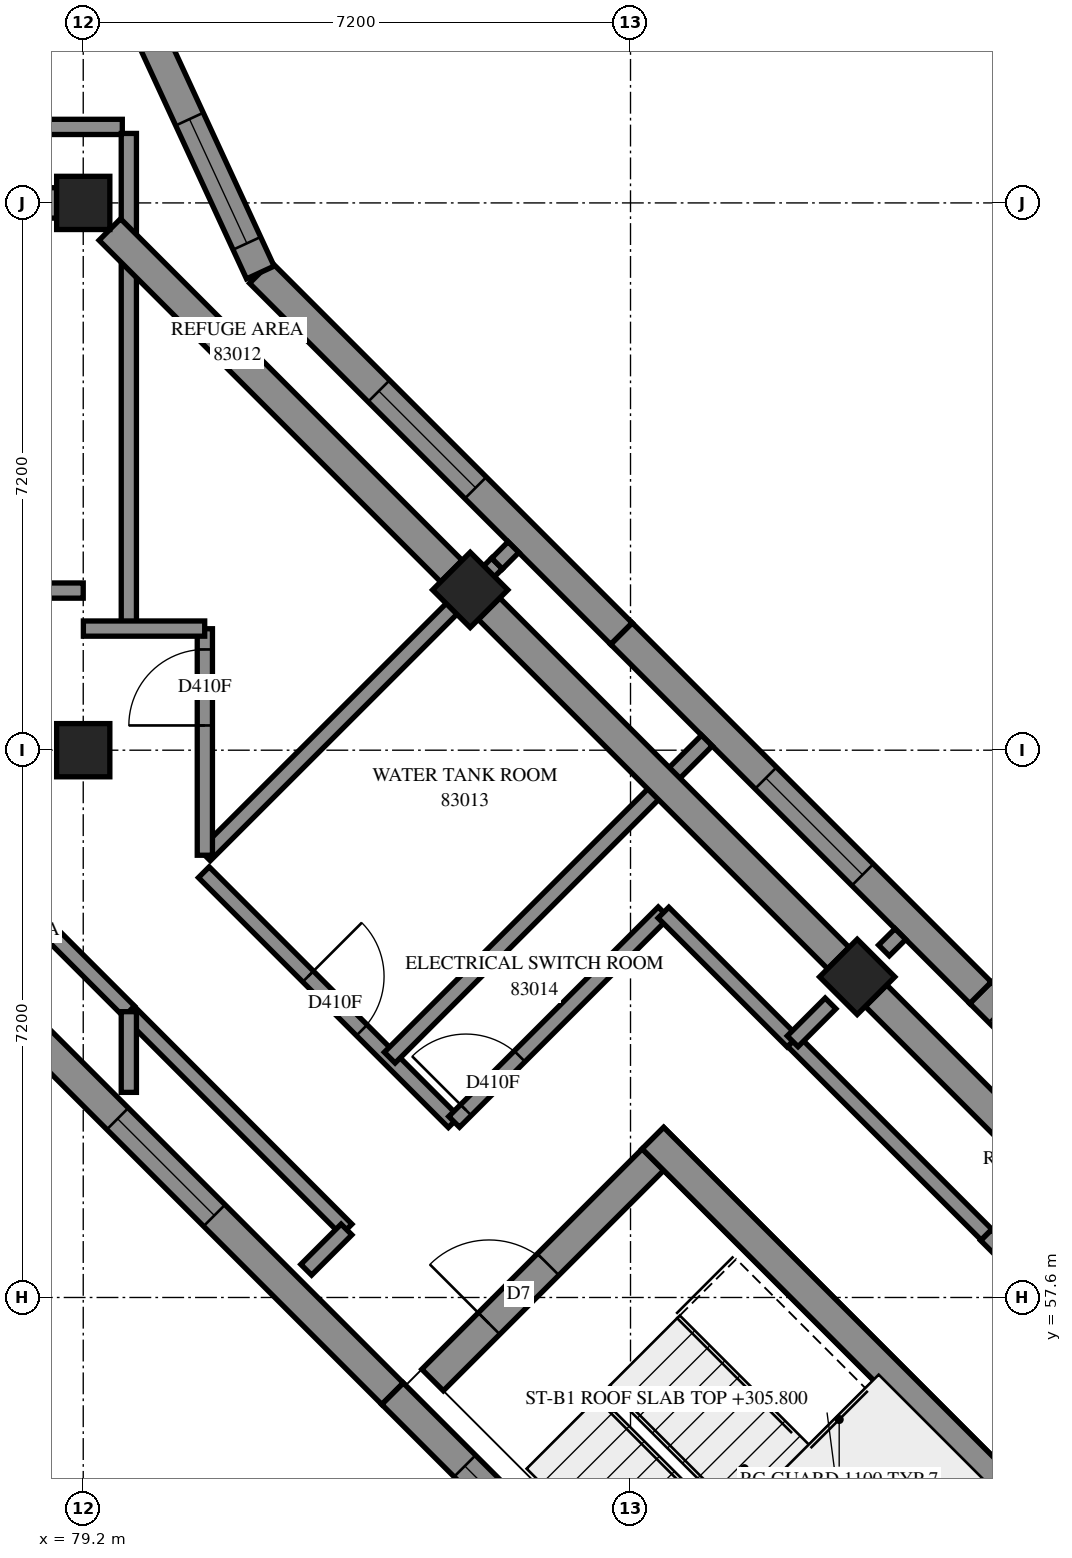
"""IFC4 building model, lengths in metres.
Left out: names, types, materials, properties, quantities, classifications, styles, units other than length and angle.
Written with IfcOpenShell. Run it as: python <this file> out.ifc"""

import sys

from ifc_helpers import new_model, si_unit, direction, frame, frame_2d, origin, origin_2d, place, context, subcontext, project, spatial, polyline, rectangle, outline, extrude, element, fill, save


model = new_model("IFC4")
c1 = context("Model", 3, precision=1e-05, world=origin(), true_north=direction((0.0, 1.0)))
c2 = subcontext(c1, "Body", "Model", "MODEL_VIEW")
j1 = project(units=[si_unit("LENGTHUNIT", "METRE"), si_unit("PLANEANGLEUNIT", "RADIAN")], contexts=[c1])
p1 = place(None, origin())
s1 = spatial("IfcSite", under=j1, at=p1, CompositionType="ELEMENT")
p2 = place(p1, origin())
s2 = spatial("IfcBuilding", under=s1, at=p2, CompositionType="ELEMENT")
p3 = place(p2, frame((0.0, 0.0, 305.8)))
s3 = spatial("IfcBuildingStorey", under=s2, at=p3, CompositionType="ELEMENT", Elevation=305.8)
for number, where, z_axis, x_axis in (
    (1, (79.2, 64.8, 0.0), (0.0, 0.0, 1.0), (1.0, 0.0, 0.0)),
    (2, (79.2, 72.0, 0.0), (0.0, 0.0, 1.0), (1.0, 0.0, 0.0)),
    (3, (84.291, 66.909, 0.0), (0.0, 0.0, 1.0), (0.707, -0.707, 0.0)),
    (4, (89.382, 61.818, 0.0), (0.0, 0.0, 1.0), (0.707, -0.707, 0.0)),
):
    element("IfcColumn", number, at=place(p3, frame(where, z_axis=z_axis, x_axis=x_axis)), inside=s3, PredefinedType="COLUMN", context=c2, shape_type="SweptSolid", body=[
        extrude(rectangle(XDim=0.7, YDim=0.7, at=origin_2d()), origin(), (0.0, 0.0, 1.0), 3.5),
    ])
p4 = place(p3, frame((86.695, 59.696, -0.3), z_axis=(0.0, 0.0, 1.0), x_axis=(0.7071100706, -0.7071034917, 0.0)))
e5 = element("IfcWall", 5, at=p4, inside=s3, PredefinedType="SHEAR", context=c2, shape_type="SweptSolid", body=[
    extrude(outline(polyline([(0.0, 0.0), (15.2, 0.0), (15.2, 3.1), (0.0, 3.1), (0.0, 0.0)])), frame((0.0, 0.2, 0.0), z_axis=(0.0, -1.0, 0.0), x_axis=(1.0, 0.0, 0.0)), (0.0, 0.0, 1.0), 0.4),
])
p5 = place(p4, frame((10.4, 0.0, 0.3)))
e6 = element("IfcOpeningElement", 6, at=p5, cuts=e5, PredefinedType="OPENING", context=c2, shape_type="SweptSolid", body=[
    extrude(rectangle(XDim=0.8, YDim=2.1, at=frame_2d((0.4, 1.05))), frame((0.0, 0.21, 0.0), z_axis=(0.0, -1.0, 0.0), x_axis=(1.0, 0.0, 0.0)), (0.0, 0.0, 1.0), 0.42),
])
p6 = place(p3, frame((83.796, 56.514, -0.3), z_axis=(0.0, 0.0, 1.0), x_axis=(0.7071067812, 0.7071067812, 0.0)))
e7 = element("IfcWall", 7, at=p6, inside=s3, PredefinedType="SHEAR", context=c2, shape_type="SweptSolid", body=[
    extrude(outline(polyline([(0.0, 0.0), (4.1, 0.0), (4.1, 3.1), (0.0, 3.1), (0.0, 0.0)])), frame((0.0, 0.2, 0.0), z_axis=(0.0, -1.0, 0.0), x_axis=(1.0, 0.0, 0.0)), (0.0, 0.0, 1.0), 0.4),
])
p7 = place(p6, frame((1.05, 0.0, 0.3)))
e8 = element("IfcOpeningElement", 8, at=p7, cuts=e7, PredefinedType="OPENING", context=c2, shape_type="SweptSolid", body=[
    extrude(rectangle(XDim=1.1, YDim=2.1, at=frame_2d((0.55, 1.05))), frame((0.0, 0.21, 0.0), z_axis=(0.0, -1.0, 0.0), x_axis=(1.0, 0.0, 0.0)), (0.0, 0.0, 1.0), 0.42),
])
p8 = place(p3, frame((95.73, 56.884, 0.0), z_axis=(0.0, 0.0, 1.0), x_axis=(-0.7071067812, 0.7071067812, 0.0)))
e9 = element("IfcWall", 9, at=p8, inside=s3, PredefinedType="SOLIDWALL", context=c2, shape_type="SweptSolid", body=[
    extrude(outline(polyline([(0.0, -0.2), (6.682, -0.2), (6.682, 0.2), (0.0, 0.2), (0.0, -0.2)])), origin(), (0.0, 0.0, 1.0), 3.5),
])
p9 = place(p8, frame((1.677, 0.0, 0.7)))
e10 = element("IfcOpeningElement", 10, at=p9, cuts=e9, PredefinedType="OPENING", context=c2, shape_type="SweptSolid", body=[
    extrude(rectangle(XDim=1.8, YDim=2.2, at=frame_2d((0.9, 1.1))), frame((0.0, 0.21, 0.0), z_axis=(0.0, -1.0, 0.0), x_axis=(1.0, 0.0, 0.0)), (0.0, 0.0, 1.0), 0.42),
])
p10 = place(p8, frame((4.529, 0.0, 0.7)))
e11 = element("IfcOpeningElement", 11, at=p10, cuts=e9, PredefinedType="OPENING", context=c2, shape_type="SweptSolid", body=[
    extrude(rectangle(XDim=1.8, YDim=2.2, at=frame_2d((0.9, 1.1))), frame((0.0, 0.21, 0.0), z_axis=(0.0, -1.0, 0.0), x_axis=(1.0, 0.0, 0.0)), (0.0, 0.0, 1.0), 0.42),
])
p11 = place(p3, frame((91.005, 61.609, 0.0), z_axis=(0.0, 0.0, 1.0), x_axis=(-0.7071142638, 0.7070992985, 0.0)))
e12 = element("IfcWall", 12, at=p11, inside=s3, PredefinedType="SOLIDWALL", context=c2, shape_type="SweptSolid", body=[
    extrude(outline(polyline([(0.0, -0.2), (6.682, -0.2), (6.682, 0.2), (0.0, 0.2), (0.0, -0.2)])), origin(), (0.0, 0.0, 1.0), 3.5),
])
p12 = place(p11, frame((2.195, 0.0, 0.7)))
e13 = element("IfcOpeningElement", 13, at=p12, cuts=e12, PredefinedType="OPENING", context=c2, shape_type="SweptSolid", body=[
    extrude(rectangle(XDim=1.8, YDim=2.2, at=frame_2d((0.9, 1.1))), frame((0.0, 0.21, 0.0), z_axis=(0.0, -1.0, 0.0), x_axis=(1.0, 0.0, 0.0)), (0.0, 0.0, 1.0), 0.42),
])
p13 = place(p3, frame((86.28, 66.334, 0.0), z_axis=(0.0, 0.0, 1.0), x_axis=(-0.7071067812, 0.7071067812, 0.0)))
e14 = element("IfcWall", 14, at=p13, inside=s3, PredefinedType="SOLIDWALL", context=c2, shape_type="SweptSolid", body=[
    extrude(outline(polyline([(0.0, -0.2), (6.682, -0.2), (6.753, 0.2), (0.0, 0.2), (0.0, -0.2)])), origin(), (0.0, 0.0, 1.0), 3.5),
])
p14 = place(p13, frame((2.712, 0.0, 0.7)))
e15 = element("IfcOpeningElement", 15, at=p14, cuts=e14, PredefinedType="OPENING", context=c2, shape_type="SweptSolid", body=[
    extrude(rectangle(XDim=1.8, YDim=2.2, at=frame_2d((0.9, 1.1))), frame((0.0, 0.21, 0.0), z_axis=(0.0, -1.0, 0.0), x_axis=(1.0, 0.0, 0.0)), (0.0, 0.0, 1.0), 0.42),
])
p15 = place(p3, frame((81.53, 71.085, 0.0), z_axis=(0.0, 0.0, 1.0), x_axis=(-0.4192593081, 0.9078665279, 0.0)))
e16 = element("IfcWall", 16, at=p15, inside=s3, PredefinedType="SOLIDWALL", context=c2, shape_type="SweptSolid", body=[
    extrude(outline(polyline([(0.036, -0.2), (3.596, -0.2), (3.34, 0.2), (-0.036, 0.2), (0.036, -0.2)])), origin(), (0.0, 0.0, 1.0), 3.5),
])
p16 = place(p15, frame((0.423, 0.0, 0.7)))
e17 = element("IfcOpeningElement", 17, at=p16, cuts=e16, PredefinedType="OPENING", context=c2, shape_type="SweptSolid", body=[
    extrude(rectangle(XDim=1.8, YDim=2.2, at=frame_2d((0.9, 1.1))), frame((0.0, 0.21, 0.0), z_axis=(0.0, -1.0, 0.0), x_axis=(1.0, 0.0, 0.0)), (0.0, 0.0, 1.0), 0.42),
])
p17 = place(p3, frame((78.548, 61.055, 0.0), z_axis=(0.0, 0.0, 1.0), x_axis=(0.7071067812, -0.7071067812, 0.0)))
e18 = element("IfcWall", 18, at=p17, inside=s3, PredefinedType="SOLIDWALL", context=c2, shape_type="SweptSolid", body=[
    extrude(outline(polyline([(0.036, -0.2), (6.677, -0.2), (6.677, 0.2), (-0.036, 0.2), (0.036, -0.2)])), origin(), (0.0, 0.0, 1.0), 3.5),
])
p18 = place(p17, frame((1.561, 0.0, 0.7)))
e19 = element("IfcOpeningElement", 19, at=p18, cuts=e18, PredefinedType="OPENING", context=c2, shape_type="SweptSolid", body=[
    extrude(rectangle(XDim=1.8, YDim=2.2, at=frame_2d((0.9, 1.1))), frame((0.0, 0.21, 0.0), z_axis=(0.0, -1.0, 0.0), x_axis=(1.0, 0.0, 0.0)), (0.0, 0.0, 1.0), 0.42),
])
p19 = place(p3, frame((83.269, 56.334, 0.0), z_axis=(0.0, 0.0, 1.0), x_axis=(0.7071067812, -0.7071067812, 0.0)))
e20 = element("IfcWall", 20, at=p19, inside=s3, PredefinedType="SOLIDWALL", context=c2, shape_type="SweptSolid", body=[
    extrude(outline(polyline([(0.0, -0.2), (6.641, -0.2), (6.641, 0.2), (0.0, 0.2), (0.0, -0.2)])), origin(), (0.0, 0.0, 1.0), 3.5),
])
p20 = place(p19, frame((1.345, 0.0, 0.7)))
e21 = element("IfcOpeningElement", 21, at=p20, cuts=e20, PredefinedType="OPENING", context=c2, shape_type="SweptSolid", body=[
    extrude(rectangle(XDim=1.8, YDim=2.2, at=frame_2d((0.9, 1.1))), frame((0.0, 0.21, 0.0), z_axis=(0.0, -1.0, 0.0), x_axis=(1.0, 0.0, 0.0)), (0.0, 0.0, 1.0), 0.42),
])
p21 = place(p19, frame((4.343, 0.0, 0.7)))
e22 = element("IfcOpeningElement", 22, at=p21, cuts=e20, PredefinedType="OPENING", context=c2, shape_type="SweptSolid", body=[
    extrude(rectangle(XDim=1.8, YDim=2.2, at=frame_2d((0.9, 1.1))), frame((0.0, 0.21, 0.0), z_axis=(0.0, -1.0, 0.0), x_axis=(1.0, 0.0, 0.0)), (0.0, 0.0, 1.0), 0.42),
])
p22 = place(p3, frame((62.767, 73.0, 0.0), z_axis=(0.0, 0.0, 1.0), x_axis=(1.0, 0.0, 0.0)))
e23 = element("IfcWall", 23, at=p22, inside=s3, PredefinedType="PARTITIONING", context=c2, shape_type="SweptSolid", body=[
    extrude(rectangle(XDim=16.947, YDim=0.2, at=frame_2d((8.473, 0.0))), origin(), (0.0, 0.0, 1.0), 3.5),
])
p23 = place(p3, frame((91.077, 58.421, 0.0), z_axis=(0.0, 0.0, 1.0), x_axis=(0.7070532037, -0.7071603546, 0.0)))
e24 = element("IfcWall", 24, at=p23, inside=s3, PredefinedType="PARTITIONING", context=c2, shape_type="SweptSolid", body=[
    extrude(rectangle(XDim=11.199, YDim=0.2, at=frame_2d((5.6, 0.0))), origin(), (0.0, 0.0, 1.0), 3.5),
])
p24 = place(p23, frame((0.286, 0.0, 0.0)))
e25 = element("IfcOpeningElement", 25, at=p24, cuts=e24, PredefinedType="OPENING", context=c2, shape_type="SweptSolid", body=[
    extrude(rectangle(XDim=1.0, YDim=2.1, at=frame_2d((0.5, 1.05))), frame((0.0, 0.11, 0.0), z_axis=(0.0, -1.0, 0.0), x_axis=(1.0, 0.0, 0.0)), (0.0, 0.0, 1.0), 0.22),
])
p25 = place(p23, frame((7.486, 0.0, 0.0)))
e26 = element("IfcOpeningElement", 26, at=p25, cuts=e24, PredefinedType="OPENING", context=c2, shape_type="SweptSolid", body=[
    extrude(rectangle(XDim=1.0, YDim=2.1, at=frame_2d((0.5, 1.05))), frame((0.0, 0.11, 0.0), z_axis=(0.0, -1.0, 0.0), x_axis=(1.0, 0.0, 0.0)), (0.0, 0.0, 1.0), 0.22),
])
p26 = place(p3, frame((79.8, 66.4, 0.0), z_axis=(0.0, 0.0, 1.0), x_axis=(0.0, 1.0, 0.0)))
e27 = element("IfcWall", 27, at=p26, inside=s3, PredefinedType="PARTITIONING", context=c2, shape_type="SweptSolid", body=[
    extrude(rectangle(XDim=6.514, YDim=0.2, at=frame_2d((3.257, 0.0))), origin(), (0.0, 0.0, 1.0), 3.5),
])
p27 = place(p3, frame((80.787, 63.194, 0.0), z_axis=(0.0, 0.0, 1.0), x_axis=(0.7071067812, -0.7071067812, 0.0)))
e28 = element("IfcWall", 28, at=p27, inside=s3, PredefinedType="PARTITIONING", context=c2, shape_type="SweptSolid", body=[
    extrude(rectangle(XDim=4.65, YDim=0.2, at=frame_2d((2.325, 0.0))), origin(), (0.0, 0.0, 1.0), 3.5),
])
p28 = place(p27, frame((1.939, 0.0, 0.0)))
e29 = element("IfcOpeningElement", 29, at=p28, cuts=e28, PredefinedType="OPENING", context=c2, shape_type="SweptSolid", body=[
    extrude(rectangle(XDim=1.0, YDim=2.1, at=frame_2d((0.5, 1.05))), frame((0.0, 0.11, 0.0), z_axis=(0.0, -1.0, 0.0), x_axis=(1.0, 0.0, 0.0)), (0.0, 0.0, 1.0), 0.22),
])
p29 = place(p3, frame((80.801, 63.417, 0.0), z_axis=(0.0, 0.0, 1.0), x_axis=(0.70732766, 0.7068858333, 0.0)))
e30 = element("IfcWall", 30, at=p29, inside=s3, PredefinedType="PARTITIONING", context=c2, shape_type="SweptSolid", body=[
    extrude(rectangle(XDim=5.432, YDim=0.2, at=frame_2d((2.716, 0.0))), origin(), (0.0, 0.0, 1.0), 3.5),
])
p30 = place(p3, frame((79.8, 61.36, 0.0), z_axis=(0.0, 0.0, 1.0), x_axis=(0.7068599295, -0.7073535467, 0.0)))
e31 = element("IfcWall", 31, at=p30, inside=s3, PredefinedType="PARTITIONING", context=c2, shape_type="SweptSolid", body=[
    extrude(rectangle(XDim=4.052, YDim=0.2, at=frame_2d((2.026, 0.0))), origin(), (0.0, 0.0, 1.0), 3.5),
])
p31 = place(p3, frame((84.079, 59.91, 0.0), z_axis=(0.0, 0.0, 1.0), x_axis=(0.7071067812, 0.7071067812, 0.0)))
e32 = element("IfcWall", 32, at=p31, inside=s3, PredefinedType="PARTITIONING", context=c2, shape_type="SweptSolid", body=[
    extrude(rectangle(XDim=3.898, YDim=0.2, at=frame_2d((1.949, 0.0))), origin(), (0.0, 0.0, 1.0), 3.5),
])
p32 = place(p31, frame((0.219, 0.0, 0.0)))
e33 = element("IfcOpeningElement", 33, at=p32, cuts=e32, PredefinedType="OPENING", context=c2, shape_type="SweptSolid", body=[
    extrude(rectangle(XDim=1.0, YDim=2.1, at=frame_2d((0.5, 1.05))), frame((0.0, 0.11, 0.0), z_axis=(0.0, -1.0, 0.0), x_axis=(1.0, 0.0, 0.0)), (0.0, 0.0, 1.0), 0.22),
])
p33 = place(p3, frame((88.537, 60.973, 0.0), z_axis=(0.0, 0.0, 1.0), x_axis=(0.7071067812, -0.7071067812, 0.0)))
e34 = element("IfcWall", 34, at=p33, inside=s3, PredefinedType="PARTITIONING", context=c2, shape_type="SweptSolid", body=[
    extrude(rectangle(XDim=3.601, YDim=0.2, at=frame_2d((1.8, 0.0))), origin(), (0.0, 0.0, 1.0), 3.5),
])
p34 = place(p3, frame((80.8, 63.418, 0.0), z_axis=(0.0, 0.0, 1.0), x_axis=(0.0, 1.0, 0.0)))
e35 = element("IfcWall", 35, at=p34, inside=s3, PredefinedType="PARTITIONING", context=c2, shape_type="SweptSolid", body=[
    extrude(rectangle(XDim=2.98, YDim=0.2, at=frame_2d((1.49, 0.0))), origin(), (0.0, 0.0, 1.0), 3.5),
])
p35 = place(p34, frame((1.708, 0.0, 0.0)))
e36 = element("IfcOpeningElement", 36, at=p35, cuts=e35, PredefinedType="OPENING", context=c2, shape_type="SweptSolid", body=[
    extrude(rectangle(XDim=1.0, YDim=2.1, at=frame_2d((0.5, 1.05))), frame((0.0, 0.11, 0.0), z_axis=(0.0, -1.0, 0.0), x_axis=(1.0, 0.0, 0.0)), (0.0, 0.0, 1.0), 0.22),
])
p36 = place(p3, frame((77.603, 63.563, 0.0), z_axis=(0.0, 0.0, 1.0), x_axis=(0.7071067812, -0.7071067812, 0.0)))
e37 = element("IfcWall", 37, at=p36, inside=s3, PredefinedType="PARTITIONING", context=c2, shape_type="SweptSolid", body=[
    extrude(rectangle(XDim=3.111, YDim=0.2, at=frame_2d((1.556, 0.0))), origin(), (0.0, 0.0, 1.0), 3.5),
])
p37 = place(p3, frame((86.833, 62.663, 0.0), z_axis=(0.0, 0.0, 1.0), x_axis=(0.7075233388, -0.706689978, 0.0)))
e38 = element("IfcWall", 38, at=p37, inside=s3, PredefinedType="PARTITIONING", context=c2, shape_type="SweptSolid", body=[
    extrude(rectangle(XDim=2.4, YDim=0.2, at=frame_2d((1.2, 0.0))), origin(), (0.0, 0.0, 1.0), 3.5),
])
p38 = place(p3, frame((77.088, 66.9, 0.0), z_axis=(0.0, 0.0, 1.0), x_axis=(1.0, 0.0, 0.0)))
e39 = element("IfcWall", 39, at=p38, inside=s3, PredefinedType="PARTITIONING", context=c2, shape_type="SweptSolid", body=[
    extrude(rectangle(XDim=2.112, YDim=0.2, at=frame_2d((1.056, 0.0))), origin(), (0.0, 0.0, 1.0), 3.5),
])
p39 = place(p3, frame((79.8, 60.298, 0.0), z_axis=(0.0, 0.0, 1.0), x_axis=(0.0, 1.0, 0.0)))
e40 = element("IfcWall", 40, at=p39, inside=s3, PredefinedType="PARTITIONING", context=c2, shape_type="SweptSolid", body=[
    extrude(rectangle(XDim=1.062, YDim=0.2, at=frame_2d((0.531, 0.0))), origin(), (0.0, 0.0, 1.0), 3.5),
])
p40 = place(p3, frame((79.202, 66.4, 0.0), z_axis=(0.0, 0.0, 1.0), x_axis=(1.0, 0.0, 0.0)))
e41 = element("IfcWall", 41, at=p40, inside=s3, PredefinedType="PARTITIONING", context=c2, shape_type="SweptSolid", body=[
    extrude(rectangle(XDim=1.596, YDim=0.2, at=frame_2d((0.798, 0.0))), origin(), (0.0, 0.0, 1.0), 3.5),
])
p41 = place(p3, frame((82.134, 57.965, 0.0), z_axis=(0.0, 0.0, 1.0), x_axis=(0.7071735177, 0.7070400384, 0.0)))
e42 = element("IfcWall", 42, at=p41, inside=s3, PredefinedType="PARTITIONING", context=c2, shape_type="SweptSolid", body=[
    extrude(rectangle(XDim=0.749, YDim=0.2, at=frame_2d((0.375, 0.0))), origin(), (0.0, 0.0, 1.0), 3.5),
])
p42 = place(p3, frame((88.534, 60.971, 0.0), z_axis=(0.0, 0.0, 1.0), x_axis=(0.7071067812, 0.7071067812, 0.0)))
e43 = element("IfcWall", 43, at=p42, inside=s3, PredefinedType="PARTITIONING", context=c2, shape_type="SweptSolid", body=[
    extrude(rectangle(XDim=0.704, YDim=0.2, at=frame_2d((0.352, 0.0))), origin(), (0.0, 0.0, 1.0), 3.5),
])
p43 = place(p3, frame((83.232, 60.756, 0.0), z_axis=(0.0, 0.0, 1.0), x_axis=(0.7072593155, 0.706954214, 0.0)))
e44 = element("IfcWall", 44, at=p43, inside=s3, PredefinedType="PARTITIONING", context=c2, shape_type="SweptSolid", body=[
    extrude(outline(polyline([(0.0, -0.1), (5.9, -0.1), (5.9, 0.1), (0.0, 0.1), (0.0, -0.1)])), origin(), (0.0, 0.0, 1.0), 3.5),
])
p44 = place(p3, frame((84.645, 67.255, 0.0), z_axis=(0.0, 0.0, 1.0), x_axis=(0.7053018997, 0.7089070674, 0.0)))
e45 = element("IfcWall", 45, at=p44, inside=s3, PredefinedType="PARTITIONING", context=c2, shape_type="SweptSolid", body=[
    extrude(outline(polyline([(0.0, -0.1), (0.305, -0.1), (0.305, 0.1), (0.0, 0.1), (0.0, -0.1)])), origin(), (0.0, 0.0, 1.0), 3.5),
])
p45 = place(p3, frame((89.734, 62.166, 0.0), z_axis=(0.0, 0.0, 1.0), x_axis=(0.7089070674, 0.7053018997, 0.0)))
e46 = element("IfcWall", 46, at=p45, inside=s3, PredefinedType="PARTITIONING", context=c2, shape_type="SweptSolid", body=[
    extrude(outline(polyline([(0.0, -0.1), (0.305, -0.1), (0.305, 0.1), (0.0, 0.1), (0.0, -0.1)])), origin(), (0.0, 0.0, 1.0), 3.5),
])
p46 = place(p12, origin())
e47 = element("IfcWindow", 47, at=p46, inside=s3, PartitioningType="SINGLE_PANEL", PredefinedType="WINDOW", context=c2, shape_type="SweptSolid", body=[
    extrude(rectangle(XDim=1.8, YDim=2.2, at=frame_2d((0.9, 1.1))), frame((0.0, 0.08, 0.0), z_axis=(0.0, -1.0, 0.0), x_axis=(1.0, 0.0, 0.0)), (0.0, 0.0, 1.0), 0.06),
])
fill(e13, e47)
p47 = place(p14, origin())
e48 = element("IfcWindow", 48, at=p47, inside=s3, PartitioningType="SINGLE_PANEL", PredefinedType="WINDOW", context=c2, shape_type="SweptSolid", body=[
    extrude(rectangle(XDim=1.8, YDim=2.2, at=frame_2d((0.9, 1.1))), frame((0.0, 0.08, 0.0), z_axis=(0.0, -1.0, 0.0), x_axis=(1.0, 0.0, 0.0)), (0.0, 0.0, 1.0), 0.06),
])
fill(e15, e48)
p48 = place(p16, origin())
e49 = element("IfcWindow", 49, at=p48, inside=s3, PartitioningType="SINGLE_PANEL", PredefinedType="WINDOW", context=c2, shape_type="SweptSolid", body=[
    extrude(rectangle(XDim=1.8, YDim=2.2, at=frame_2d((0.9, 1.1))), frame((0.0, 0.08, 0.0), z_axis=(0.0, -1.0, 0.0), x_axis=(1.0, 0.0, 0.0)), (0.0, 0.0, 1.0), 0.06),
])
fill(e17, e49)
p49 = place(p18, origin())
e50 = element("IfcWindow", 50, at=p49, inside=s3, PartitioningType="SINGLE_PANEL", PredefinedType="WINDOW", context=c2, shape_type="SweptSolid", body=[
    extrude(rectangle(XDim=1.8, YDim=2.2, at=frame_2d((0.9, 1.1))), frame((0.0, 0.08, 0.0), z_axis=(0.0, -1.0, 0.0), x_axis=(1.0, 0.0, 0.0)), (0.0, 0.0, 1.0), 0.06),
])
fill(e19, e50)
p50 = place(p20, origin())
e51 = element("IfcWindow", 51, at=p50, inside=s3, PartitioningType="SINGLE_PANEL", PredefinedType="WINDOW", context=c2, shape_type="SweptSolid", body=[
    extrude(rectangle(XDim=1.8, YDim=2.2, at=frame_2d((0.9, 1.1))), frame((0.0, 0.08, 0.0), z_axis=(0.0, -1.0, 0.0), x_axis=(1.0, 0.0, 0.0)), (0.0, 0.0, 1.0), 0.06),
])
fill(e21, e51)
p51 = place(p7, origin())
e52 = element("IfcDoor", 52, at=p51, inside=s3, OperationType="SINGLE_SWING_LEFT", PredefinedType="DOOR", context=c2, shape_type="SweptSolid", body=[
    extrude(rectangle(XDim=1.1, YDim=2.1, at=frame_2d((0.55, 1.05))), frame((0.0, 0.025, 0.0), z_axis=(0.0, -1.0, 0.0), x_axis=(1.0, 0.0, 0.0)), (0.0, 0.0, 1.0), 0.05),
])
fill(e8, e52)
p52 = place(p35, origin())
e53 = element("IfcDoor", 53, at=p52, inside=s3, OperationType="SINGLE_SWING_RIGHT", PredefinedType="DOOR", context=c2, shape_type="SweptSolid", body=[
    extrude(rectangle(XDim=1.0, YDim=2.1, at=frame_2d((0.5, 1.05))), frame((0.0, 0.025, 0.0), z_axis=(0.0, -1.0, 0.0), x_axis=(1.0, 0.0, 0.0)), (0.0, 0.0, 1.0), 0.05),
])
fill(e36, e53)
p53 = place(p28, origin())
e54 = element("IfcDoor", 54, at=p53, inside=s3, OperationType="SINGLE_SWING_LEFT", PredefinedType="DOOR", context=c2, shape_type="SweptSolid", body=[
    extrude(rectangle(XDim=1.0, YDim=2.1, at=frame_2d((0.5, 1.05))), frame((0.0, 0.025, 0.0), z_axis=(0.0, -1.0, 0.0), x_axis=(1.0, 0.0, 0.0)), (0.0, 0.0, 1.0), 0.05),
])
fill(e29, e54)
p54 = place(p32, origin())
e55 = element("IfcDoor", 55, at=p54, inside=s3, OperationType="SINGLE_SWING_RIGHT", PredefinedType="DOOR", context=c2, shape_type="SweptSolid", body=[
    extrude(rectangle(XDim=1.0, YDim=2.1, at=frame_2d((0.5, 1.05))), frame((0.0, 0.025, 0.0), z_axis=(0.0, -1.0, 0.0), x_axis=(1.0, 0.0, 0.0)), (0.0, 0.0, 1.0), 0.05),
])
fill(e33, e55)
save(model, sys.argv[1])
